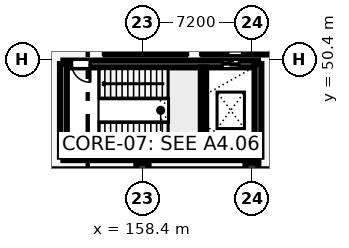
"""IFC4 building model, lengths in metres.
Left out: names, types, materials, properties, quantities, classifications, styles, units other than length and angle.
Written with IfcOpenShell. Run it as: python <this file> out.ifc"""

import sys

from ifc_helpers import new_model, si_unit, direction, frame, frame_2d, origin, origin_2d, place, context, subcontext, project, spatial, rectangle, circle, extrude, element, fill, save


model = new_model("IFC4")
c1 = context("Model", 3, precision=1e-05, world=origin(), true_north=direction((0.0, 1.0)))
c2 = subcontext(c1, "Body", "Model", "MODEL_VIEW")
j1 = project(units=[si_unit("LENGTHUNIT", "METRE"), si_unit("PLANEANGLEUNIT", "RADIAN")], contexts=[c1])
p1 = place(None, origin())
s1 = spatial("IfcSite", under=j1, at=p1, CompositionType="ELEMENT")
p2 = place(p1, origin())
s2 = spatial("IfcBuilding", under=s1, at=p2, CompositionType="ELEMENT")
p3 = place(p2, frame((0.0, 0.0, 5.4)))
s3 = spatial("IfcBuildingStorey", under=s2, at=p3, CompositionType="ELEMENT", Elevation=5.4)
p4 = place(p3, frame((158.4, 43.2, 0.0), z_axis=(0.0, 0.0, 1.0), x_axis=(1.0, 0.0, 0.0)))
e1 = element("IfcColumn", 1, at=p4, inside=s3, PredefinedType="COLUMN", context=c2, shape_type="SweptSolid", body=[
    extrude(circle(Radius=0.4, at=origin_2d()), origin(), (0.0, 0.0, 1.0), 4.2),
])
p5 = place(p3, frame((165.6, 43.2, 0.0), z_axis=(0.0, 0.0, 1.0), x_axis=(1.0, 0.0, 0.0)))
e2 = element("IfcColumn", 2, at=p5, inside=s3, PredefinedType="COLUMN", context=c2, shape_type="SweptSolid", body=[
    extrude(rectangle(XDim=0.85, YDim=0.85, at=origin_2d()), origin(), (0.0, 0.0, 1.0), 4.2),
])
p6 = place(p3, frame((153.2, 44.0, 0.0), z_axis=(0.0, 0.0, 1.0), x_axis=(1.0, 0.0, 0.0)))
e3 = element("IfcWall", 3, at=p6, inside=s3, PredefinedType="SHEAR", context=c2, shape_type="SweptSolid", body=[
    extrude(rectangle(XDim=12.8, YDim=0.45, at=frame_2d((6.4, 0.0))), origin(), (0.0, 0.0, 1.0), 3.92),
])
p7 = place(p3, frame((153.2, 50.1, 0.0), z_axis=(0.0, 0.0, 1.0), x_axis=(1.0, 0.0, 0.0)))
e4 = element("IfcWall", 4, at=p7, inside=s3, PredefinedType="SHEAR", context=c2, shape_type="SweptSolid", body=[
    extrude(rectangle(XDim=12.8, YDim=0.45, at=frame_2d((6.4, 0.0))), origin(), (0.0, 0.0, 1.0), 3.92),
])
p8 = place(p7, frame((0.55, 0.0, 0.0)))
e5 = element("IfcOpeningElement", 5, at=p8, cuts=e4, PredefinedType="OPENING", context=c2, shape_type="SweptSolid", body=[
    extrude(rectangle(XDim=1.2, YDim=2.25, at=frame_2d((0.6, 1.125))), frame((0.0, 0.235, 0.0), z_axis=(0.0, -1.0, 0.0), x_axis=(1.0, 0.0, 0.0)), (0.0, 0.0, 1.0), 0.47),
])
p9 = place(p7, frame((10.458, 0.0, 0.0)))
e6 = element("IfcOpeningElement", 6, at=p9, cuts=e4, PredefinedType="OPENING", context=c2, shape_type="SweptSolid", body=[
    extrude(rectangle(XDim=1.1, YDim=2.2, at=frame_2d((0.55, 1.1))), frame((0.0, 0.235, 0.0), z_axis=(0.0, -1.0, 0.0), x_axis=(1.0, 0.0, 0.0)), (0.0, 0.0, 1.0), 0.47),
])
for number, where, z_axis, x_axis in (
    (7, (153.2, 44.0, 0.0), (0.0, 0.0, 1.0), (0.0, 1.0, 0.0)),
    (8, (166.0, 44.0, 0.0), (0.0, 0.0, 1.0), (0.0, 1.0, 0.0)),
):
    element("IfcWall", number, at=place(p3, frame(where, z_axis=z_axis, x_axis=x_axis)), inside=s3, PredefinedType="SHEAR", context=c2, shape_type="SweptSolid", body=[
        extrude(rectangle(XDim=6.1, YDim=0.45, at=frame_2d((3.05, 0.0))), origin(), (0.0, 0.0, 1.0), 3.92),
    ])
p10 = place(p3, frame((162.416, 44.225, 0.0), z_axis=(0.0, 0.0, 1.0), x_axis=(0.0, 1.0, 0.0)))
e9 = element("IfcWall", 9, at=p10, inside=s3, PredefinedType="SHEAR", context=c2, shape_type="SweptSolid", body=[
    extrude(rectangle(XDim=5.65, YDim=0.35, at=frame_2d((2.825, 0.0))), origin(), (0.0, 0.0, 1.0), 3.92),
])
p11 = place(p3, frame((156.0, 50.8, 0.0), z_axis=(0.0, 0.0, 1.0), x_axis=(1.0, 0.0, 0.0)))
e10 = element("IfcWall", 10, at=p11, inside=s3, PredefinedType="PARTITIONING", context=c2, shape_type="SweptSolid", body=[
    extrude(rectangle(XDim=5.2, YDim=0.15, at=frame_2d((2.6, 0.0))), origin(), (0.0, 0.0, 1.0), 2.98),
])
p12 = place(p3, frame((161.2, 50.8, 0.0), z_axis=(0.0, 0.0, 1.0), x_axis=(0.0, 1.0, 0.0)))
e11 = element("IfcWall", 11, at=p12, inside=s3, PredefinedType="PARTITIONING", context=c2, shape_type="SweptSolid", body=[
    extrude(rectangle(XDim=5.8, YDim=0.15, at=frame_2d((2.9, 0.0))), origin(), (0.0, 0.0, 1.0), 2.98),
])
p13 = place(p3, frame((156.0, 56.6, 0.0), z_axis=(0.0, 0.0, 1.0), x_axis=(0.0, -1.0, 0.0)))
e12 = element("IfcWall", 12, at=p13, inside=s3, PredefinedType="PARTITIONING", context=c2, shape_type="SweptSolid", body=[
    extrude(rectangle(XDim=5.8, YDim=0.15, at=frame_2d((2.9, 0.0))), origin(), (0.0, 0.0, 1.0), 2.98),
])
p14 = place(p13, frame((2.375, 0.0, 0.0)))
e13 = element("IfcOpeningElement", 13, at=p14, cuts=e12, PredefinedType="OPENING", context=c2, shape_type="SweptSolid", body=[
    extrude(rectangle(XDim=1.05, YDim=2.2, at=frame_2d((0.525, 1.1))), frame((0.0, 0.085, 0.0), z_axis=(0.0, -1.0, 0.0), x_axis=(1.0, 0.0, 0.0)), (0.0, 0.0, 1.0), 0.17),
])
p15 = place(p3, frame((162.4, 50.8, 0.0), z_axis=(0.0, 0.0, 1.0), x_axis=(1.0, 0.0, 0.0)))
e14 = element("IfcWall", 14, at=p15, inside=s3, PredefinedType="PARTITIONING", context=c2, shape_type="SweptSolid", body=[
    extrude(rectangle(XDim=4.2, YDim=0.15, at=frame_2d((2.1, 0.0))), origin(), (0.0, 0.0, 1.0), 2.98),
])
p16 = place(p15, frame((1.625, 0.0, 0.0)))
e15 = element("IfcOpeningElement", 15, at=p16, cuts=e14, PredefinedType="OPENING", context=c2, shape_type="SweptSolid", body=[
    extrude(rectangle(XDim=0.95, YDim=2.15, at=frame_2d((0.475, 1.075))), frame((0.0, 0.085, 0.0), z_axis=(0.0, -1.0, 0.0), x_axis=(1.0, 0.0, 0.0)), (0.0, 0.0, 1.0), 0.17),
])
for number, where, z_axis, x_axis in (
    (16, (166.6, 50.8, 0.0), (0.0, 0.0, 1.0), (0.0, 1.0, 0.0)),
    (17, (162.4, 56.6, 0.0), (0.0, 0.0, 1.0), (0.0, -1.0, 0.0)),
):
    element("IfcWall", number, at=place(p3, frame(where, z_axis=z_axis, x_axis=x_axis)), inside=s3, PredefinedType="PARTITIONING", context=c2, shape_type="SweptSolid", body=[
        extrude(rectangle(XDim=5.8, YDim=0.15, at=frame_2d((2.9, 0.0))), origin(), (0.0, 0.0, 1.0), 2.98),
    ])
p17 = place(p8, frame((1.2, 0.0, 0.0), z_axis=(0.0, 0.0, 1.0), x_axis=(-1.0, 0.0, 0.0)))
e18 = element("IfcDoor", 18, at=p17, inside=s3, OperationType="SINGLE_SWING_RIGHT", PredefinedType="DOOR", context=c2, shape_type="SweptSolid", body=[
    extrude(rectangle(XDim=1.2, YDim=2.25, at=frame_2d((0.6, 1.125))), frame((0.0, 0.025, 0.0), z_axis=(0.0, -1.0, 0.0), x_axis=(1.0, 0.0, 0.0)), (0.0, 0.0, 1.0), 0.05),
])
fill(e5, e18)
p18 = place(p9, origin())
e19 = element("IfcDoor", 19, at=p18, inside=s3, OperationType="SLIDING_TO_LEFT", PredefinedType="DOOR", context=c2, shape_type="SweptSolid", body=[
    extrude(rectangle(XDim=1.1, YDim=2.2, at=frame_2d((0.55, 1.1))), frame((0.0, 0.025, 0.0), z_axis=(0.0, -1.0, 0.0), x_axis=(1.0, 0.0, 0.0)), (0.0, 0.0, 1.0), 0.05),
])
fill(e6, e19)
p19 = place(p16, origin())
e20 = element("IfcDoor", 20, at=p19, inside=s3, OperationType="SINGLE_SWING_LEFT", PredefinedType="DOOR", context=c2, shape_type="SweptSolid", body=[
    extrude(rectangle(XDim=0.95, YDim=2.15, at=frame_2d((0.475, 1.075))), frame((0.0, 0.025, 0.0), z_axis=(0.0, -1.0, 0.0), x_axis=(1.0, 0.0, 0.0)), (0.0, 0.0, 1.0), 0.05),
])
fill(e15, e20)
save(model, sys.argv[1])
